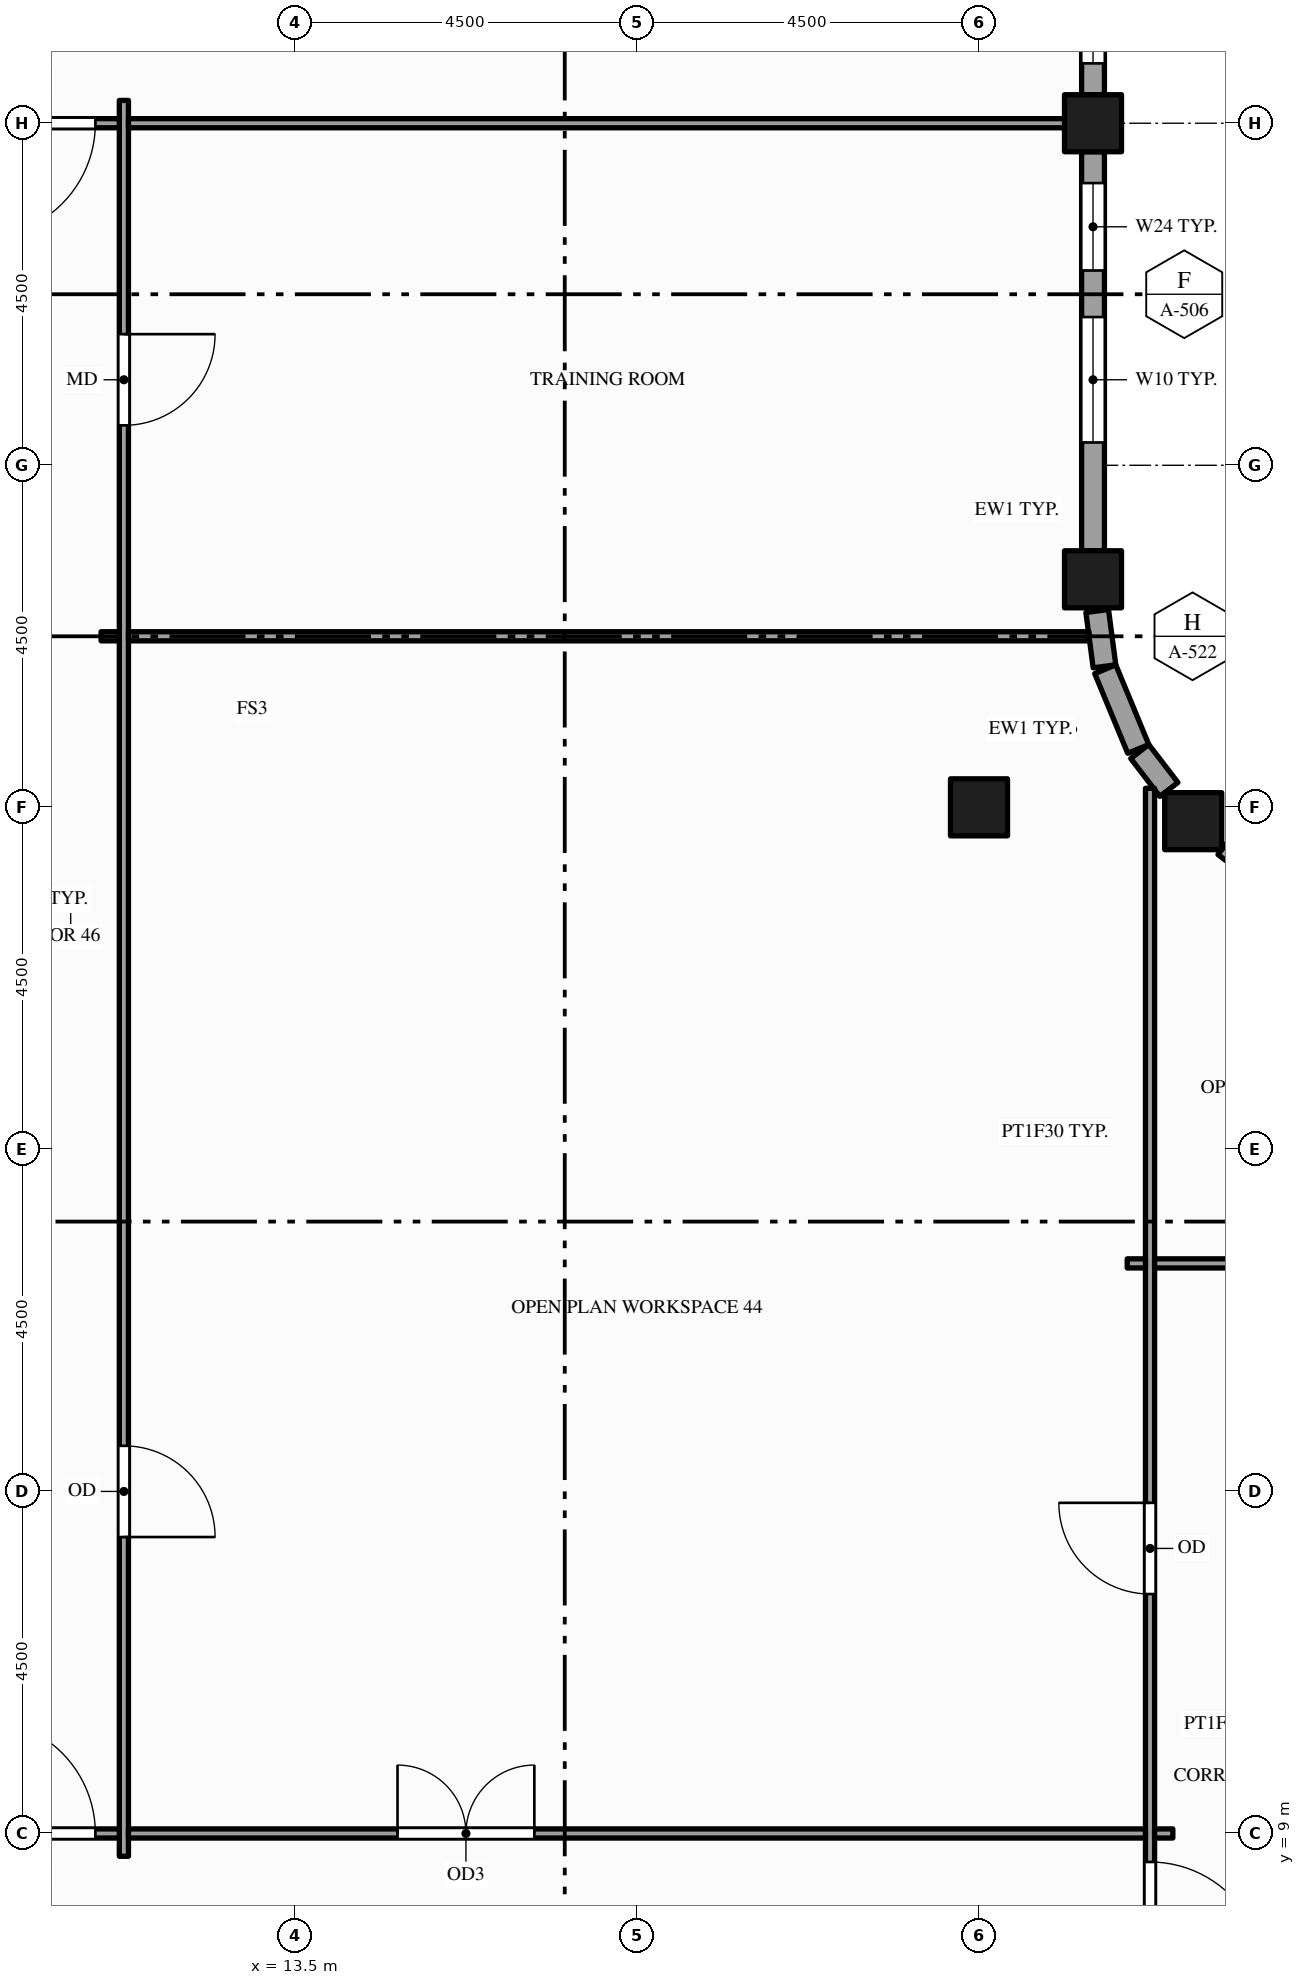
"""IFC4 building model, lengths in metres.
Left out: names, types, materials, properties, quantities, classifications, styles, units other than length and angle.
Written with IfcOpenShell. Run it as: python <this file> out.ifc"""

import sys

from ifc_helpers import new_model, si_unit, direction, frame, frame_2d, origin, origin_2d, place, context, subcontext, project, spatial, rectangle, hollow_rectangle, extrude, element, fill, save


model = new_model("IFC4")
c1 = context("Model", 3, precision=1e-05, world=origin(), true_north=direction((0.0, 1.0)))
c2 = subcontext(c1, "Body", "Model", "MODEL_VIEW")
j1 = project(units=[si_unit("LENGTHUNIT", "METRE"), si_unit("PLANEANGLEUNIT", "RADIAN")], contexts=[c1])
p1 = place(None, origin())
s1 = spatial("IfcSite", under=j1, at=p1, CompositionType="ELEMENT")
p2 = place(p1, origin())
s2 = spatial("IfcBuilding", under=s1, at=p2, CompositionType="ELEMENT")
p3 = place(p2, frame((0.0, 0.0, 223.0)))
s3 = spatial("IfcBuildingStorey", under=s2, at=p3, CompositionType="ELEMENT", Elevation=223.0)
for number, where, z_axis, x_axis in (
    (1, (22.5, 22.5, -0.15), (0.0, 0.0, 1.0), (1.0, 0.0, 0.0)),
    (2, (24.0, 25.5, -0.15), (0.0, 0.0, 1.0), (1.0, 0.0, 0.0)),
    (3, (24.0, 31.5, -0.15), (0.0, 0.0, 1.0), (1.0, 0.0, 0.0)),
    (4, (25.318, 22.318, -0.15), (0.0, 0.0, 1.0), (1.0, 0.0, 0.0)),
):
    element("IfcColumn", number, at=place(p3, frame(where, z_axis=z_axis, x_axis=x_axis)), inside=s3, PredefinedType="COLUMN", context=c2, shape_type="SweptSolid", body=[
        extrude(hollow_rectangle(XDim=0.75, YDim=0.75, WallThickness=0.036, at=origin_2d()), origin(), (0.0, 0.0, 1.0), 4.0),
    ])
p4 = place(p3, frame((26.234, 21.615, 0.0), z_axis=(0.0, 0.0, 1.0), x_axis=(-0.793575131083, 0.608472276547, 0.0)))
e5 = element("IfcWall", 5, at=p4, inside=s3, PredefinedType="STANDARD", context=c2, shape_type="SweptSolid", body=[
    extrude(rectangle(XDim=0.629, YDim=0.3, at=frame_2d((0.314, 0.0))), origin(), (0.0, 0.0, 1.0), 3.157),
])
p5 = place(p3, frame((24.998, 22.735, 0.0), z_axis=(0.0, 0.0, 1.0), x_axis=(-0.608472276547, 0.793575131083, 0.0)))
e6 = element("IfcWall", 6, at=p5, inside=s3, PredefinedType="STANDARD", context=c2, shape_type="SweptSolid", body=[
    extrude(rectangle(XDim=0.629, YDim=0.3, at=frame_2d((0.314, 0.0))), origin(), (0.0, 0.0, 1.0), 2.76),
])
p6 = place(p3, frame((24.595, 23.268, 0.0), z_axis=(0.0, 0.0, 1.0), x_axis=(-0.382598720491, 0.923914616768, 0.0)))
e7 = element("IfcWall", 7, at=p6, inside=s3, PredefinedType="STANDARD", context=c2, shape_type="SweptSolid", body=[
    extrude(rectangle(XDim=1.135, YDim=0.3, at=frame_2d((0.568, 0.0))), origin(), (0.0, 0.0, 1.0), 2.76),
])
p7 = place(p3, frame((24.151, 24.355, 0.0), z_axis=(0.0, 0.0, 1.0), x_axis=(-0.130660917588, 0.99142711513, 0.0)))
e8 = element("IfcWall", 8, at=p7, inside=s3, PredefinedType="STANDARD", context=c2, shape_type="SweptSolid", body=[
    extrude(rectangle(XDim=0.734, YDim=0.3, at=frame_2d((0.367, 0.0))), origin(), (0.0, 0.0, 1.0), 3.157),
])
p8 = place(p3, frame((24.0, 25.875, 0.0), z_axis=(0.0, 0.0, 1.0), x_axis=(0.0, 1.0, 0.0)))
e9 = element("IfcWall", 9, at=p8, inside=s3, PredefinedType="STANDARD", context=c2, shape_type="SweptSolid", body=[
    extrude(rectangle(XDim=5.25, YDim=0.3, at=frame_2d((2.625, 0.0))), origin(), (0.0, 0.0, 1.0), 3.157),
])
p9 = place(p8, frame((1.425, 0.0, 0.9)))
e10 = element("IfcOpeningElement", 10, at=p9, cuts=e9, PredefinedType="OPENING", context=c2, shape_type="SweptSolid", body=[
    extrude(rectangle(XDim=1.65, YDim=2.0, at=frame_2d((0.825, 1.0))), frame((0.0, 0.16, 0.0), z_axis=(0.0, -1.0, 0.0), x_axis=(1.0, 0.0, 0.0)), (0.0, 0.0, 1.0), 0.32),
])
p10 = place(p8, frame((3.688, 0.0, 0.9)))
e11 = element("IfcOpeningElement", 11, at=p10, cuts=e9, PredefinedType="OPENING", context=c2, shape_type="SweptSolid", body=[
    extrude(rectangle(XDim=1.15, YDim=2.0, at=frame_2d((0.575, 1.0))), frame((0.0, 0.16, 0.0), z_axis=(0.0, -1.0, 0.0), x_axis=(1.0, 0.0, 0.0)), (0.0, 0.0, 1.0), 0.32),
])
p11 = place(p3, frame((24.0, 31.875, 0.0), z_axis=(0.0, 0.0, 1.0), x_axis=(0.0, 1.0, 0.0)))
e12 = element("IfcWall", 12, at=p11, inside=s3, PredefinedType="STANDARD", context=c2, shape_type="SweptSolid", body=[
    extrude(rectangle(XDim=3.75, YDim=0.3, at=frame_2d((1.875, 0.0))), origin(), (0.0, 0.0, 1.0), 3.157),
])
p12 = place(p11, frame((0.413, 0.0, 0.9)))
e13 = element("IfcOpeningElement", 13, at=p12, cuts=e12, PredefinedType="OPENING", context=c2, shape_type="SweptSolid", body=[
    extrude(rectangle(XDim=1.15, YDim=2.0, at=frame_2d((0.575, 1.0))), frame((0.0, 0.16, 0.0), z_axis=(0.0, -1.0, 0.0), x_axis=(1.0, 0.0, 0.0)), (0.0, 0.0, 1.0), 0.32),
])
p13 = place(p11, frame((2.188, 0.0, 0.9)))
e14 = element("IfcOpeningElement", 14, at=p13, cuts=e12, PredefinedType="OPENING", context=c2, shape_type="SweptSolid", body=[
    extrude(rectangle(XDim=1.15, YDim=2.0, at=frame_2d((0.575, 1.0))), frame((0.0, 0.16, 0.0), z_axis=(0.0, -1.0, 0.0), x_axis=(1.0, 0.0, 0.0)), (0.0, 0.0, 1.0), 0.32),
])
p14 = place(p3, frame((11.25, 8.7, 0.0), z_axis=(0.0, 0.0, 1.0), x_axis=(0.0, 1.0, 0.0)))
e15 = element("IfcWall", 15, at=p14, inside=s3, PredefinedType="PARTITIONING", context=c2, shape_type="SweptSolid", body=[
    extrude(rectangle(XDim=23.1, YDim=0.12, at=frame_2d((11.55, 0.0))), origin(), (0.0, 0.0, 1.0), 2.6),
])
p15 = place(p14, frame((18.825, 0.0, 0.0)))
e16 = element("IfcOpeningElement", 16, at=p15, cuts=e15, PredefinedType="OPENING", context=c2, shape_type="SweptSolid", body=[
    extrude(rectangle(XDim=1.2, YDim=2.1, at=frame_2d((0.6, 1.05))), frame((0.0, 0.07, 0.0), z_axis=(0.0, -1.0, 0.0), x_axis=(1.0, 0.0, 0.0)), (0.0, 0.0, 1.0), 0.14),
])
p16 = place(p14, frame((4.2, 0.0, 0.0)))
e17 = element("IfcOpeningElement", 17, at=p16, cuts=e15, PredefinedType="OPENING", context=c2, shape_type="SweptSolid", body=[
    extrude(rectangle(XDim=1.2, YDim=2.1, at=frame_2d((0.6, 1.05))), frame((0.0, 0.07, 0.0), z_axis=(0.0, -1.0, 0.0), x_axis=(1.0, 0.0, 0.0)), (0.0, 0.0, 1.0), 0.14),
])
p17 = place(p3, frame((24.75, -1.35, 0.0), z_axis=(0.0, 0.0, 1.0), x_axis=(0.0, 1.0, 0.0)))
e18 = element("IfcWall", 18, at=p17, inside=s3, PredefinedType="PARTITIONING", context=c2, shape_type="SweptSolid", body=[
    extrude(rectangle(XDim=24.101, YDim=0.12, at=frame_2d((12.05, 0.0))), origin(), (0.0, 0.0, 1.0), 2.76),
])
p18 = place(p17, frame((8.475, 0.0, 0.0)))
e19 = element("IfcOpeningElement", 19, at=p18, cuts=e18, PredefinedType="OPENING", context=c2, shape_type="SweptSolid", body=[
    extrude(rectangle(XDim=1.5, YDim=2.1, at=frame_2d((0.75, 1.05))), frame((0.0, 0.07, 0.0), z_axis=(0.0, -1.0, 0.0), x_axis=(1.0, 0.0, 0.0)), (0.0, 0.0, 1.0), 0.14),
])
p19 = place(p17, frame((13.5, 0.0, 0.0)))
e20 = element("IfcOpeningElement", 20, at=p19, cuts=e18, PredefinedType="OPENING", context=c2, shape_type="SweptSolid", body=[
    extrude(rectangle(XDim=1.2, YDim=2.1, at=frame_2d((0.6, 1.05))), frame((0.0, 0.07, 0.0), z_axis=(0.0, -1.0, 0.0), x_axis=(1.0, 0.0, 0.0)), (0.0, 0.0, 1.0), 0.14),
])
p20 = place(p3, frame((9.06, 9.0, 0.0), z_axis=(0.0, 0.0, 1.0), x_axis=(1.0, 0.0, 0.0)))
e21 = element("IfcWall", 21, at=p20, inside=s3, PredefinedType="PARTITIONING", context=c2, shape_type="SweptSolid", body=[
    extrude(rectangle(XDim=2.13, YDim=0.12, at=frame_2d((1.065, 0.0))), origin(), (0.0, 0.0, 1.0), 2.87),
])
p21 = place(p20, frame((0.315, 0.0, 0.0)))
e22 = element("IfcOpeningElement", 22, at=p21, cuts=e21, PredefinedType="OPENING", context=c2, shape_type="SweptSolid", body=[
    extrude(rectangle(XDim=1.5, YDim=2.1, at=frame_2d((0.75, 1.05))), frame((0.0, 0.07, 0.0), z_axis=(0.0, -1.0, 0.0), x_axis=(1.0, 0.0, 0.0)), (0.0, 0.0, 1.0), 0.14),
])
p22 = place(p3, frame((11.31, 9.0, 0.0), z_axis=(0.0, 0.0, 1.0), x_axis=(1.0, 0.0, 0.0)))
e23 = element("IfcWall", 23, at=p22, inside=s3, PredefinedType="PARTITIONING", context=c2, shape_type="SweptSolid", body=[
    extrude(rectangle(XDim=13.38, YDim=0.12, at=frame_2d((6.69, 0.0))), origin(), (0.0, 0.0, 1.0), 2.76),
])
p23 = place(p22, frame((3.54, 0.0, 0.0)))
e24 = element("IfcOpeningElement", 24, at=p23, cuts=e23, PredefinedType="OPENING", context=c2, shape_type="SweptSolid", body=[
    extrude(rectangle(XDim=1.8, YDim=2.1, at=frame_2d((0.9, 1.05))), frame((0.0, 0.07, 0.0), z_axis=(0.0, -1.0, 0.0), x_axis=(1.0, 0.0, 0.0)), (0.0, 0.0, 1.0), 0.14),
])
for number, where, z_axis, x_axis in (
    (25, (24.81, 9.0, 0.0), (0.0, 0.0, 1.0), (1.0, 0.0, 0.0)),
    (26, (24.45, 16.5, 0.0), (0.0, 0.0, 1.0), (1.0, 0.0, 0.0)),
):
    element("IfcWall", number, at=place(p3, frame(where, z_axis=z_axis, x_axis=x_axis)), inside=s3, PredefinedType="PARTITIONING", context=c2, shape_type="SweptSolid", body=[
        extrude(rectangle(XDim=0.24, YDim=0.12, at=frame_2d((0.12, 0.0))), origin(), (0.0, 0.0, 1.0), 2.76),
    ])
p24 = place(p3, frame((24.81, 16.5, 0.0), z_axis=(0.0, 0.0, 1.0), x_axis=(1.0, 0.0, 0.0)))
e27 = element("IfcWall", 27, at=p24, inside=s3, PredefinedType="PARTITIONING", context=c2, shape_type="SweptSolid", body=[
    extrude(rectangle(XDim=2.13, YDim=0.12, at=frame_2d((1.065, 0.0))), origin(), (0.0, 0.0, 1.0), 2.76),
])
p25 = place(p3, frame((10.95, 24.75, 0.0), z_axis=(0.0, 0.0, 1.0), x_axis=(1.0, 0.0, 0.0)))
e28 = element("IfcWall", 28, at=p25, inside=s3, PredefinedType="PARTITIONING", context=c2, shape_type="SweptSolid", body=[
    extrude(rectangle(XDim=0.24, YDim=0.12, at=frame_2d((0.12, 0.0))), origin(), (0.0, 0.0, 1.0), 2.87),
])
p26 = place(p3, frame((11.31, 24.75, 0.0), z_axis=(0.0, 0.0, 1.0), x_axis=(1.0, 0.0, 0.0)))
e29 = element("IfcWall", 29, at=p26, inside=s3, PredefinedType="PARTITIONING", context=c2, shape_type="SweptSolid", body=[
    extrude(rectangle(XDim=12.637, YDim=0.12, at=frame_2d((6.319, 0.0))), origin(), (0.0, 0.0, 1.0), 2.87),
])
p27 = place(p3, frame((9.06, 31.5, 0.0), z_axis=(0.0, 0.0, 1.0), x_axis=(1.0, 0.0, 0.0)))
e30 = element("IfcWall", 30, at=p27, inside=s3, PredefinedType="PARTITIONING", context=c2, shape_type="SweptSolid", body=[
    extrude(rectangle(XDim=2.13, YDim=0.12, at=frame_2d((1.065, 0.0))), origin(), (0.0, 0.0, 1.0), 2.87),
])
p28 = place(p27, frame((0.315, 0.0, 0.0)))
e31 = element("IfcOpeningElement", 31, at=p28, cuts=e30, PredefinedType="OPENING", context=c2, shape_type="SweptSolid", body=[
    extrude(rectangle(XDim=1.5, YDim=2.1, at=frame_2d((0.75, 1.05))), frame((0.0, 0.07, 0.0), z_axis=(0.0, -1.0, 0.0), x_axis=(1.0, 0.0, 0.0)), (0.0, 0.0, 1.0), 0.14),
])
p29 = place(p3, frame((11.31, 31.5, 0.0), z_axis=(0.0, 0.0, 1.0), x_axis=(1.0, 0.0, 0.0)))
e32 = element("IfcWall", 32, at=p29, inside=s3, PredefinedType="PARTITIONING", context=c2, shape_type="SweptSolid", body=[
    extrude(rectangle(XDim=12.54, YDim=0.12, at=frame_2d((6.27, 0.0))), origin(), (0.0, 0.0, 1.0), 2.87),
])
p30 = place(p9, origin())
e33 = element("IfcWindow", 33, at=p30, inside=s3, PartitioningType="SINGLE_PANEL", PredefinedType="WINDOW", context=c2, shape_type="SweptSolid", body=[
    extrude(rectangle(XDim=1.65, YDim=2.0, at=frame_2d((0.825, 1.0))), frame((0.0, 0.03, 0.0), z_axis=(0.0, -1.0, 0.0), x_axis=(1.0, 0.0, 0.0)), (0.0, 0.0, 1.0), 0.06),
])
fill(e10, e33)
p31 = place(p10, origin())
e34 = element("IfcWindow", 34, at=p31, inside=s3, PartitioningType="SINGLE_PANEL", PredefinedType="WINDOW", context=c2, shape_type="SweptSolid", body=[
    extrude(rectangle(XDim=1.15, YDim=2.0, at=frame_2d((0.575, 1.0))), frame((0.0, 0.03, 0.0), z_axis=(0.0, -1.0, 0.0), x_axis=(1.0, 0.0, 0.0)), (0.0, 0.0, 1.0), 0.06),
])
fill(e11, e34)
p32 = place(p12, origin())
e35 = element("IfcWindow", 35, at=p32, inside=s3, PartitioningType="SINGLE_PANEL", PredefinedType="WINDOW", context=c2, shape_type="SweptSolid", body=[
    extrude(rectangle(XDim=1.15, YDim=2.0, at=frame_2d((0.575, 1.0))), frame((0.0, 0.03, 0.0), z_axis=(0.0, -1.0, 0.0), x_axis=(1.0, 0.0, 0.0)), (0.0, 0.0, 1.0), 0.06),
])
fill(e13, e35)
p33 = place(p18, origin())
e36 = element("IfcDoor", 36, at=p33, inside=s3, OperationType="SINGLE_SWING_LEFT", PredefinedType="DOOR", context=c2, shape_type="SweptSolid", body=[
    extrude(rectangle(XDim=1.5, YDim=2.1, at=frame_2d((0.75, 1.05))), frame((0.0, 0.025, 0.0), z_axis=(0.0, -1.0, 0.0), x_axis=(1.0, 0.0, 0.0)), (0.0, 0.0, 1.0), 0.05),
])
fill(e19, e36)
p34 = place(p23, origin())
e37 = element("IfcDoor", 37, at=p34, inside=s3, OperationType="DOUBLE_DOOR_SINGLE_SWING", PredefinedType="DOOR", context=c2, shape_type="SweptSolid", body=[
    extrude(rectangle(XDim=1.8, YDim=2.1, at=frame_2d((0.9, 1.05))), frame((0.0, 0.025, 0.0), z_axis=(0.0, -1.0, 0.0), x_axis=(1.0, 0.0, 0.0)), (0.0, 0.0, 1.0), 0.05),
])
fill(e24, e37)
p35 = place(p21, origin())
e38 = element("IfcDoor", 38, at=p35, inside=s3, OperationType="SINGLE_SWING_LEFT", PredefinedType="DOOR", context=c2, shape_type="SweptSolid", body=[
    extrude(rectangle(XDim=1.5, YDim=2.1, at=frame_2d((0.75, 1.05))), frame((0.0, 0.025, 0.0), z_axis=(0.0, -1.0, 0.0), x_axis=(1.0, 0.0, 0.0)), (0.0, 0.0, 1.0), 0.05),
])
fill(e22, e38)
p36 = place(p28, origin())
e39 = element("IfcDoor", 39, at=p36, inside=s3, OperationType="SINGLE_SWING_LEFT", PredefinedType="DOOR", context=c2, shape_type="SweptSolid", body=[
    extrude(rectangle(XDim=1.5, YDim=2.1, at=frame_2d((0.75, 1.05))), frame((0.0, 0.025, 0.0), z_axis=(0.0, -1.0, 0.0), x_axis=(1.0, 0.0, 0.0)), (0.0, 0.0, 1.0), 0.05),
])
fill(e31, e39)
p37 = place(p15, origin())
e40 = element("IfcDoor", 40, at=p37, inside=s3, OperationType="SINGLE_SWING_RIGHT", PredefinedType="DOOR", context=c2, shape_type="SweptSolid", body=[
    extrude(rectangle(XDim=1.2, YDim=2.1, at=frame_2d((0.6, 1.05))), frame((0.0, 0.025, 0.0), z_axis=(0.0, -1.0, 0.0), x_axis=(1.0, 0.0, 0.0)), (0.0, 0.0, 1.0), 0.05),
])
fill(e16, e40)
p38 = place(p16, origin())
e41 = element("IfcDoor", 41, at=p38, inside=s3, OperationType="SINGLE_SWING_LEFT", PredefinedType="DOOR", context=c2, shape_type="SweptSolid", body=[
    extrude(rectangle(XDim=1.2, YDim=2.1, at=frame_2d((0.6, 1.05))), frame((0.0, 0.025, 0.0), z_axis=(0.0, -1.0, 0.0), x_axis=(1.0, 0.0, 0.0)), (0.0, 0.0, 1.0), 0.05),
])
fill(e17, e41)
p39 = place(p19, origin())
e42 = element("IfcDoor", 42, at=p39, inside=s3, OperationType="SINGLE_SWING_RIGHT", PredefinedType="DOOR", context=c2, shape_type="SweptSolid", body=[
    extrude(rectangle(XDim=1.2, YDim=2.1, at=frame_2d((0.6, 1.05))), frame((0.0, 0.025, 0.0), z_axis=(0.0, -1.0, 0.0), x_axis=(1.0, 0.0, 0.0)), (0.0, 0.0, 1.0), 0.05),
])
fill(e20, e42)
save(model, sys.argv[1])
